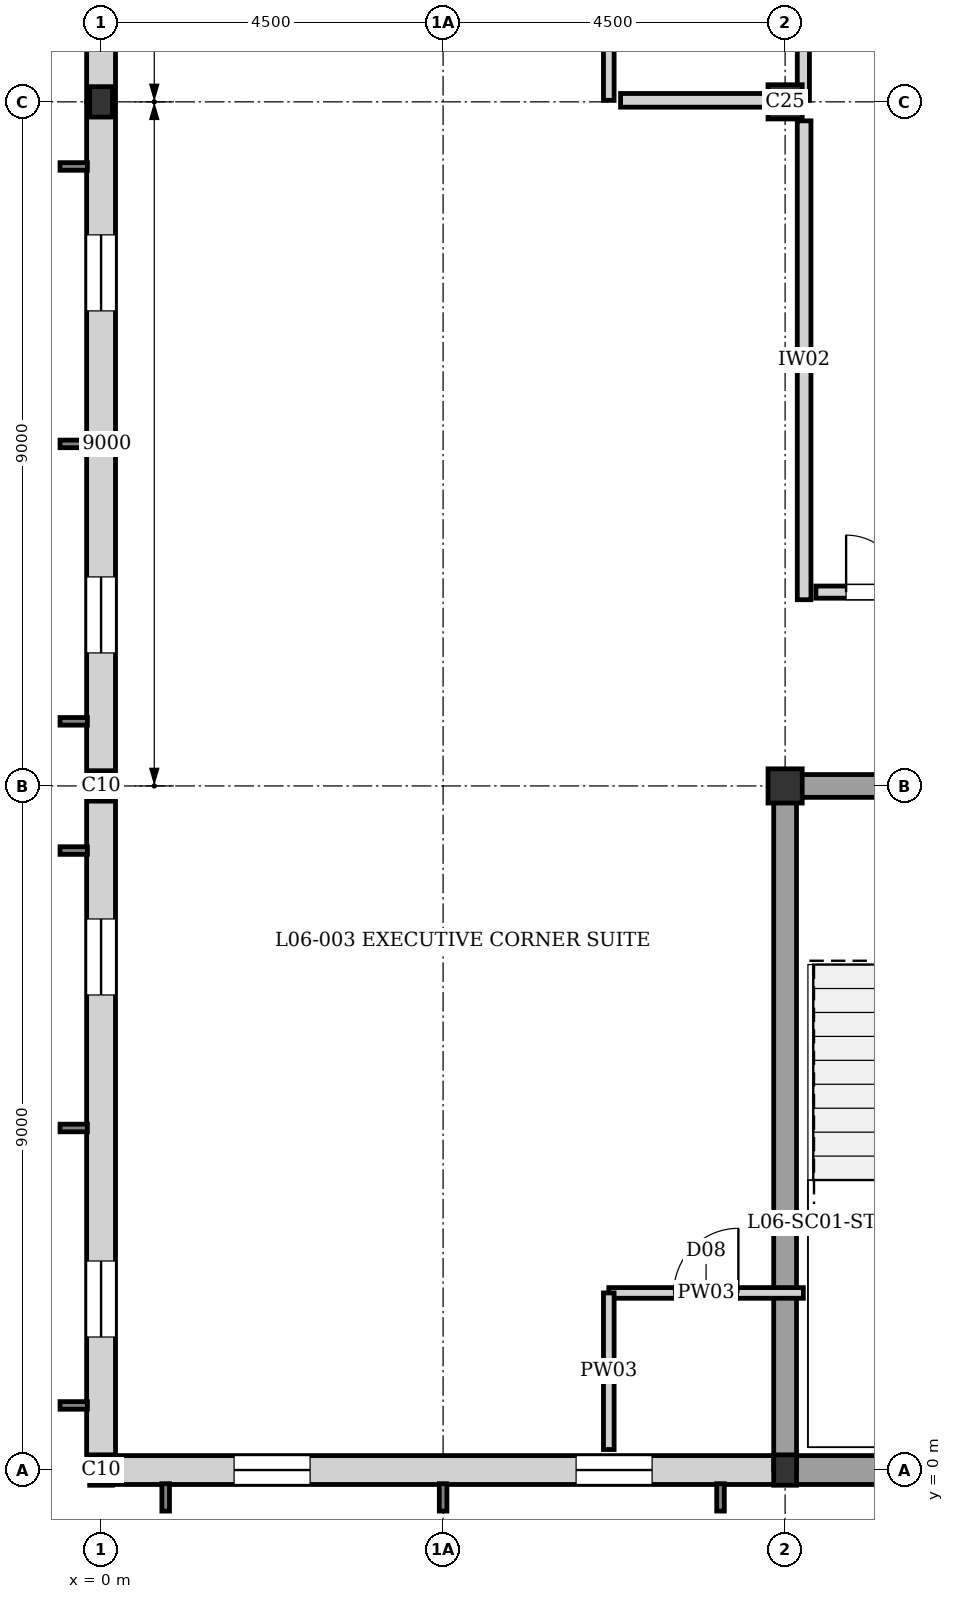
"""IFC4 building model, lengths in metres.
Left out: names, types, materials, properties, quantities, classifications, styles, units other than length and angle.
Written with IfcOpenShell. Run it as: python <this file> out.ifc"""

import sys

from ifc_helpers import new_model, si_unit, direction, frame, frame_2d, origin, origin_2d, place, context, subcontext, project, spatial, rectangle, i_section, extrude, element, fill, save


model = new_model("IFC4")
c1 = context("Model", 3, precision=1e-05, world=origin(), true_north=direction((0.0, 1.0)))
c2 = subcontext(c1, "Body", "Model", "MODEL_VIEW")
j1 = project(units=[si_unit("LENGTHUNIT", "METRE"), si_unit("PLANEANGLEUNIT", "RADIAN")], contexts=[c1])
p1 = place(None, origin())
s1 = spatial("IfcSite", under=j1, at=p1, CompositionType="ELEMENT")
p2 = place(p1, origin())
s2 = spatial("IfcBuilding", under=s1, at=p2, CompositionType="ELEMENT")
p3 = place(p2, frame((0.0, 0.0, 20.64)))
s3 = spatial("IfcBuildingStorey", under=s2, at=p3, CompositionType="ELEMENT", Elevation=20.64)
for number, where, z_axis, x_axis in (
    (1, (0.0, 0.0, 0.0), (0.0, 0.0, 1.0), (1.0, 0.0, 0.0)),
    (2, (0.0, 9.0, 0.0), (0.0, 0.0, 1.0), (1.0, 0.0, 0.0)),
    (3, (0.0, 18.0, 0.0), (0.0, 0.0, 1.0), (1.0, 0.0, 0.0)),
    (4, (9.0, 0.0, 0.0), (0.0, 0.0, 1.0), (1.0, 0.0, 0.0)),
):
    element("IfcColumn", number, at=place(p3, frame(where, z_axis=z_axis, x_axis=x_axis)), inside=s3, PredefinedType="COLUMN", context=c2, shape_type="SweptSolid", body=[
        extrude(i_section(OverallWidth=0.3, OverallDepth=0.4, WebThickness=0.013, FlangeThickness=0.024, at=origin_2d()), origin(), (0.0, 0.0, 1.0), 3.04),
    ])
for number, where, z_axis, x_axis in (
    (5, (9.0, 9.0, 0.0), (0.0, 0.0, 1.0), (1.0, 0.0, 0.0)),
    (6, (9.0, 18.0, 0.0), (0.0, 0.0, 1.0), (1.0, 0.0, 0.0)),
):
    element("IfcColumn", number, at=place(p3, frame(where, z_axis=z_axis, x_axis=x_axis)), inside=s3, PredefinedType="COLUMN", context=c2, shape_type="SweptSolid", body=[
        extrude(rectangle(XDim=0.45, YDim=0.45, at=origin_2d()), origin(), (0.0, 0.0, 1.0), 3.04),
    ])
p4 = place(p3, frame((18.0, 0.0, 0.0), z_axis=(0.0, 0.0, 1.0), x_axis=(-1.0, 0.0, 0.0)))
e7 = element("IfcWall", 7, at=p4, inside=s3, PredefinedType="SOLIDWALL", context=c2, shape_type="SweptSolid", body=[
    extrude(rectangle(XDim=9.0, YDim=0.38, at=frame_2d((4.5, 0.0))), origin(), (0.0, 0.0, 1.0), 2.82),
])
p5 = place(p3, frame((8.87, 0.0, 0.0), z_axis=(0.0, 0.0, 1.0), x_axis=(-1.0, 0.0, 0.0)))
e8 = element("IfcWall", 8, at=p5, inside=s3, PredefinedType="SOLIDWALL", context=c2, shape_type="SweptSolid", body=[
    extrude(rectangle(XDim=8.87, YDim=0.38, at=frame_2d((4.435, 0.0))), origin(), (0.0, 0.0, 1.0), 2.55),
])
p6 = place(p5, frame((1.62, 0.0, 0.35)))
e9 = element("IfcOpeningElement", 9, at=p6, cuts=e8, PredefinedType="OPENING", context=c2, shape_type="SweptSolid", body=[
    extrude(rectangle(XDim=1.0, YDim=1.6, at=frame_2d((0.5, 0.8))), frame((0.0, 0.2, 0.0), z_axis=(0.0, -1.0, 0.0), x_axis=(1.0, 0.0, 0.0)), (0.0, 0.0, 1.0), 0.4),
])
p7 = place(p5, frame((6.12, 0.0, 0.35)))
e10 = element("IfcOpeningElement", 10, at=p7, cuts=e8, PredefinedType="OPENING", context=c2, shape_type="SweptSolid", body=[
    extrude(rectangle(XDim=1.0, YDim=1.6, at=frame_2d((0.5, 0.8))), frame((0.0, 0.2, 0.0), z_axis=(0.0, -1.0, 0.0), x_axis=(1.0, 0.0, 0.0)), (0.0, 0.0, 1.0), 0.4),
])
p8 = place(p3, frame((0.0, 0.155, 0.0), z_axis=(0.0, 0.0, 1.0), x_axis=(0.0, 1.0, 0.0)))
e11 = element("IfcWall", 11, at=p8, inside=s3, PredefinedType="SOLIDWALL", context=c2, shape_type="SweptSolid", body=[
    extrude(rectangle(XDim=8.845, YDim=0.38, at=frame_2d((4.422, 0.0))), origin(), (0.0, 0.0, 1.0), 2.48),
])
p9 = place(p8, frame((1.595, 0.0, 0.35)))
e12 = element("IfcOpeningElement", 12, at=p9, cuts=e11, PredefinedType="OPENING", context=c2, shape_type="SweptSolid", body=[
    extrude(rectangle(XDim=1.0, YDim=1.6, at=frame_2d((0.5, 0.8))), frame((0.0, 0.2, 0.0), z_axis=(0.0, -1.0, 0.0), x_axis=(1.0, 0.0, 0.0)), (0.0, 0.0, 1.0), 0.4),
])
p10 = place(p8, frame((6.095, 0.0, 0.35)))
e13 = element("IfcOpeningElement", 13, at=p10, cuts=e11, PredefinedType="OPENING", context=c2, shape_type="SweptSolid", body=[
    extrude(rectangle(XDim=1.0, YDim=1.6, at=frame_2d((0.5, 0.8))), frame((0.0, 0.2, 0.0), z_axis=(0.0, -1.0, 0.0), x_axis=(1.0, 0.0, 0.0)), (0.0, 0.0, 1.0), 0.4),
])
p11 = place(p3, frame((0.0, 9.0, 0.0), z_axis=(0.0, 0.0, 1.0), x_axis=(0.0, 1.0, 0.0)))
e14 = element("IfcWall", 14, at=p11, inside=s3, PredefinedType="SOLIDWALL", context=c2, shape_type="SweptSolid", body=[
    extrude(rectangle(XDim=9.0, YDim=0.38, at=frame_2d((4.5, 0.0))), origin(), (0.0, 0.0, 1.0), 2.42),
])
p12 = place(p11, frame((1.75, 0.0, 0.35)))
e15 = element("IfcOpeningElement", 15, at=p12, cuts=e14, PredefinedType="OPENING", context=c2, shape_type="SweptSolid", body=[
    extrude(rectangle(XDim=1.0, YDim=1.6, at=frame_2d((0.5, 0.8))), frame((0.0, 0.2, 0.0), z_axis=(0.0, -1.0, 0.0), x_axis=(1.0, 0.0, 0.0)), (0.0, 0.0, 1.0), 0.4),
])
p13 = place(p11, frame((6.25, 0.0, 0.35)))
e16 = element("IfcOpeningElement", 16, at=p13, cuts=e14, PredefinedType="OPENING", context=c2, shape_type="SweptSolid", body=[
    extrude(rectangle(XDim=1.0, YDim=1.6, at=frame_2d((0.5, 0.8))), frame((0.0, 0.2, 0.0), z_axis=(0.0, -1.0, 0.0), x_axis=(1.0, 0.0, 0.0)), (0.0, 0.0, 1.0), 0.4),
])
p14 = place(p3, frame((0.0, 18.0, 0.0), z_axis=(0.0, 0.0, 1.0), x_axis=(0.0, 1.0, 0.0)))
e17 = element("IfcWall", 17, at=p14, inside=s3, PredefinedType="SOLIDWALL", context=c2, shape_type="SweptSolid", body=[
    extrude(rectangle(XDim=9.0, YDim=0.38, at=frame_2d((4.5, 0.0))), origin(), (0.0, 0.0, 1.0), 2.38),
])
p15 = place(p14, frame((1.75, 0.0, 0.35)))
e18 = element("IfcOpeningElement", 18, at=p15, cuts=e17, PredefinedType="OPENING", context=c2, shape_type="SweptSolid", body=[
    extrude(rectangle(XDim=1.0, YDim=1.6, at=frame_2d((0.5, 0.8))), frame((0.0, 0.2, 0.0), z_axis=(0.0, -1.0, 0.0), x_axis=(1.0, 0.0, 0.0)), (0.0, 0.0, 1.0), 0.4),
])
p16 = place(p14, frame((6.25, 0.0, 0.35)))
e19 = element("IfcOpeningElement", 19, at=p16, cuts=e17, PredefinedType="OPENING", context=c2, shape_type="SweptSolid", body=[
    extrude(rectangle(XDim=1.0, YDim=1.6, at=frame_2d((0.5, 0.8))), frame((0.0, 0.2, 0.0), z_axis=(0.0, -1.0, 0.0), x_axis=(1.0, 0.0, 0.0)), (0.0, 0.0, 1.0), 0.4),
])
p17 = place(p3, frame((9.0, 9.0, 0.0), z_axis=(0.0, 0.0, 1.0), x_axis=(1.0, 0.0, 0.0)))
e20 = element("IfcWall", 20, at=p17, inside=s3, PredefinedType="SHEAR", context=c2, shape_type="SweptSolid", body=[
    extrude(rectangle(XDim=9.0, YDim=0.3, at=frame_2d((4.5, 0.0))), origin(), (0.0, 0.0, 1.0), 2.82),
])
p18 = place(p17, frame((5.95, 0.0, 0.0)))
e21 = element("IfcOpeningElement", 21, at=p18, cuts=e20, PredefinedType="OPENING", context=c2, shape_type="SweptSolid", body=[
    extrude(rectangle(XDim=1.6, YDim=2.1, at=frame_2d((0.8, 1.05))), frame((0.0, 0.16, 0.0), z_axis=(0.0, -1.0, 0.0), x_axis=(1.0, 0.0, 0.0)), (0.0, 0.0, 1.0), 0.32),
])
p19 = place(p3, frame((9.0, 0.0, 0.0), z_axis=(0.0, 0.0, 1.0), x_axis=(0.0, 1.0, 0.0)))
e22 = element("IfcWall", 22, at=p19, inside=s3, PredefinedType="SHEAR", context=c2, shape_type="SweptSolid", body=[
    extrude(rectangle(XDim=9.0, YDim=0.3, at=frame_2d((4.5, 0.0))), origin(), (0.0, 0.0, 1.0), 2.82),
])
p20 = place(p3, frame((6.68, 2.33, 0.0), z_axis=(0.0, 0.0, 1.0), x_axis=(1.0, 0.0, 0.0)))
e23 = element("IfcWall", 23, at=p20, inside=s3, PredefinedType="PLUMBINGWALL", context=c2, shape_type="SweptSolid", body=[
    extrude(rectangle(XDim=2.56, YDim=0.14, at=frame_2d((1.28, 0.0))), origin(), (0.0, 0.0, 1.0), 2.82),
])
p21 = place(p20, frame((0.855, 0.0, 0.0)))
e24 = element("IfcOpeningElement", 24, at=p21, cuts=e23, PredefinedType="OPENING", context=c2, shape_type="SweptSolid", body=[
    extrude(rectangle(XDim=0.85, YDim=2.04, at=frame_2d((0.425, 1.02))), frame((0.0, 0.08, 0.0), z_axis=(0.0, -1.0, 0.0), x_axis=(1.0, 0.0, 0.0)), (0.0, 0.0, 1.0), 0.16),
])
p22 = place(p3, frame((6.68, 0.27, 0.0), z_axis=(0.0, 0.0, 1.0), x_axis=(0.0, 1.0, 0.0)))
e25 = element("IfcWall", 25, at=p22, inside=s3, PredefinedType="PLUMBINGWALL", context=c2, shape_type="SweptSolid", body=[
    extrude(rectangle(XDim=2.06, YDim=0.14, at=frame_2d((1.03, 0.0))), origin(), (0.0, 0.0, 1.0), 2.82),
])
p23 = place(p3, frame((9.24, 18.02, 0.0), z_axis=(0.0, 0.0, 1.0), x_axis=(0.0, 1.0, 0.0)))
e26 = element("IfcWall", 26, at=p23, inside=s3, PredefinedType="PARTITIONING", context=c2, shape_type="SweptSolid", body=[
    extrude(rectangle(XDim=2.06, YDim=0.16, at=frame_2d((1.03, 0.0))), origin(), (0.0, 0.0, 1.0), 2.82),
])
p24 = place(p3, frame((6.68, 18.02, 0.0), z_axis=(0.0, 0.0, 1.0), x_axis=(0.0, 1.0, 0.0)))
e27 = element("IfcWall", 27, at=p24, inside=s3, PredefinedType="PLUMBINGWALL", context=c2, shape_type="SweptSolid", body=[
    extrude(rectangle(XDim=2.06, YDim=0.14, at=frame_2d((1.03, 0.0))), origin(), (0.0, 0.0, 1.0), 2.82),
])
p25 = place(p3, frame((9.25, 11.45, 0.0), z_axis=(0.0, 0.0, 1.0), x_axis=(0.0, 1.0, 0.0)))
e28 = element("IfcWall", 28, at=p25, inside=s3, PredefinedType="PARTITIONING", context=c2, shape_type="SweptSolid", body=[
    extrude(rectangle(XDim=6.3, YDim=0.18, at=frame_2d((3.15, 0.0))), origin(), (0.0, 0.0, 1.0), 2.82),
])
p26 = place(p3, frame((6.835, 18.02, 0.0), z_axis=(0.0, 0.0, 1.0), x_axis=(1.0, 0.0, 0.0)))
e29 = element("IfcWall", 29, at=p26, inside=s3, PredefinedType="PARTITIONING", context=c2, shape_type="SweptSolid", body=[
    extrude(rectangle(XDim=2.26, YDim=0.18, at=frame_2d((1.13, 0.0))), origin(), (0.0, 0.0, 1.0), 2.55),
])
p27 = place(p3, frame((9.405, 11.55, 0.0), z_axis=(0.0, 0.0, 1.0), x_axis=(1.0, 0.0, 0.0)))
e30 = element("IfcWall", 30, at=p27, inside=s3, PredefinedType="PARTITIONING", context=c2, shape_type="SweptSolid", body=[
    extrude(rectangle(XDim=2.295, YDim=0.16, at=frame_2d((1.147, 0.0))), origin(), (0.0, 0.0, 1.0), 2.82),
])
p28 = place(p27, frame((0.397, 0.0, 0.0)))
e31 = element("IfcOpeningElement", 31, at=p28, cuts=e30, PredefinedType="OPENING", context=c2, shape_type="SweptSolid", body=[
    extrude(rectangle(XDim=1.5, YDim=2.1, at=frame_2d((0.75, 1.05))), frame((0.0, 0.09, 0.0), z_axis=(0.0, -1.0, 0.0), x_axis=(1.0, 0.0, 0.0)), (0.0, 0.0, 1.0), 0.18),
])
p29 = place(p6, origin())
e32 = element("IfcWindow", 32, at=p29, inside=s3, PartitioningType="SINGLE_PANEL", PredefinedType="WINDOW", context=c2, shape_type="SweptSolid", body=[
    extrude(rectangle(XDim=1.0, YDim=1.6, at=frame_2d((0.5, 0.8))), frame((0.0, 0.03, 0.0), z_axis=(0.0, -1.0, 0.0), x_axis=(1.0, 0.0, 0.0)), (0.0, 0.0, 1.0), 0.06),
])
fill(e9, e32)
p30 = place(p7, origin())
e33 = element("IfcWindow", 33, at=p30, inside=s3, PartitioningType="SINGLE_PANEL", PredefinedType="WINDOW", context=c2, shape_type="SweptSolid", body=[
    extrude(rectangle(XDim=1.0, YDim=1.6, at=frame_2d((0.5, 0.8))), frame((0.0, 0.03, 0.0), z_axis=(0.0, -1.0, 0.0), x_axis=(1.0, 0.0, 0.0)), (0.0, 0.0, 1.0), 0.06),
])
fill(e10, e33)
p31 = place(p9, origin())
e34 = element("IfcWindow", 34, at=p31, inside=s3, PartitioningType="SINGLE_PANEL", PredefinedType="WINDOW", context=c2, shape_type="SweptSolid", body=[
    extrude(rectangle(XDim=1.0, YDim=1.6, at=frame_2d((0.5, 0.8))), frame((0.0, 0.03, 0.0), z_axis=(0.0, -1.0, 0.0), x_axis=(1.0, 0.0, 0.0)), (0.0, 0.0, 1.0), 0.06),
])
fill(e12, e34)
p32 = place(p10, origin())
e35 = element("IfcWindow", 35, at=p32, inside=s3, PartitioningType="SINGLE_PANEL", PredefinedType="WINDOW", context=c2, shape_type="SweptSolid", body=[
    extrude(rectangle(XDim=1.0, YDim=1.6, at=frame_2d((0.5, 0.8))), frame((0.0, 0.03, 0.0), z_axis=(0.0, -1.0, 0.0), x_axis=(1.0, 0.0, 0.0)), (0.0, 0.0, 1.0), 0.06),
])
fill(e13, e35)
p33 = place(p12, origin())
e36 = element("IfcWindow", 36, at=p33, inside=s3, PartitioningType="SINGLE_PANEL", PredefinedType="WINDOW", context=c2, shape_type="SweptSolid", body=[
    extrude(rectangle(XDim=1.0, YDim=1.6, at=frame_2d((0.5, 0.8))), frame((0.0, 0.03, 0.0), z_axis=(0.0, -1.0, 0.0), x_axis=(1.0, 0.0, 0.0)), (0.0, 0.0, 1.0), 0.06),
])
fill(e15, e36)
p34 = place(p13, origin())
e37 = element("IfcWindow", 37, at=p34, inside=s3, PartitioningType="SINGLE_PANEL", PredefinedType="WINDOW", context=c2, shape_type="SweptSolid", body=[
    extrude(rectangle(XDim=1.0, YDim=1.6, at=frame_2d((0.5, 0.8))), frame((0.0, 0.03, 0.0), z_axis=(0.0, -1.0, 0.0), x_axis=(1.0, 0.0, 0.0)), (0.0, 0.0, 1.0), 0.06),
])
fill(e16, e37)
p35 = place(p21, origin())
e38 = element("IfcDoor", 38, at=p35, inside=s3, OperationType="SINGLE_SWING_RIGHT", PredefinedType="DOOR", context=c2, shape_type="SweptSolid", body=[
    extrude(rectangle(XDim=0.85, YDim=2.04, at=frame_2d((0.425, 1.02))), frame((0.0, 0.025, 0.0), z_axis=(0.0, -1.0, 0.0), x_axis=(1.0, 0.0, 0.0)), (0.0, 0.0, 1.0), 0.05),
])
fill(e24, e38)
p36 = place(p28, origin())
e39 = element("IfcDoor", 39, at=p36, inside=s3, OperationType="DOUBLE_DOOR_SINGLE_SWING", PredefinedType="DOOR", context=c2, shape_type="SweptSolid", body=[
    extrude(rectangle(XDim=1.5, YDim=2.1, at=frame_2d((0.75, 1.05))), frame((0.0, 0.025, 0.0), z_axis=(0.0, -1.0, 0.0), x_axis=(1.0, 0.0, 0.0)), (0.0, 0.0, 1.0), 0.05),
])
fill(e31, e39)
save(model, sys.argv[1])
